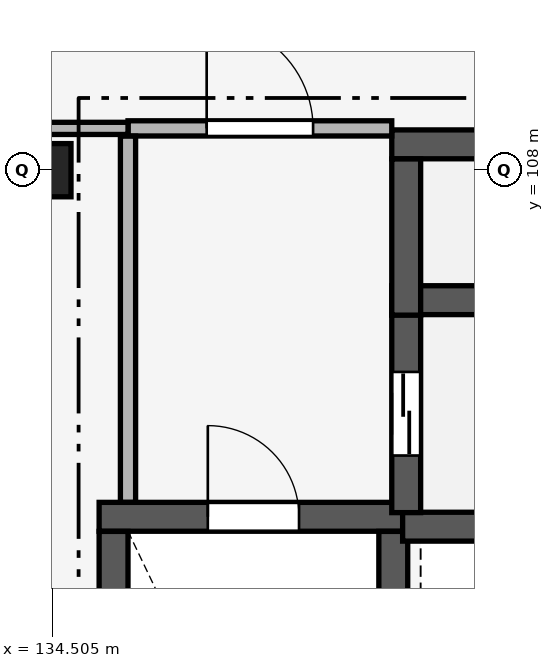
"""IFC4 building model, lengths in metres.
Left out: names, types, materials, properties, quantities, classifications, styles, units other than length and angle.
Written with IfcOpenShell. Run it as: python <this file> out.ifc"""

import sys

from ifc_helpers import new_model, si_unit, direction, frame, frame_2d, origin, origin_2d, place, context, subcontext, project, spatial, rectangle, extrude, element, fill, save


model = new_model("IFC4")
c1 = context("Model", 3, precision=1e-05, world=origin(), true_north=direction((0.0, 1.0)))
c2 = subcontext(c1, "Body", "Model", "MODEL_VIEW")
j1 = project(units=[si_unit("LENGTHUNIT", "METRE"), si_unit("PLANEANGLEUNIT", "RADIAN")], contexts=[c1])
p1 = place(None, origin())
s1 = spatial("IfcSite", under=j1, at=p1, CompositionType="ELEMENT")
p2 = place(p1, origin())
s2 = spatial("IfcBuilding", under=s1, at=p2, CompositionType="ELEMENT")
p3 = place(p2, frame((0.0, 0.0, 25.2)))
s3 = spatial("IfcBuildingStorey", under=s2, at=p3, CompositionType="ELEMENT", Elevation=25.2)
p4 = place(p3, frame((134.4, 108.0, 0.0), z_axis=(0.0, 0.0, 1.0), x_axis=(1.0, 0.0, 0.0)))
e1 = element("IfcColumn", 1, at=p4, inside=s3, PredefinedType="COLUMN", context=c2, shape_type="SweptSolid", body=[
    extrude(rectangle(XDim=0.7, YDim=0.7, at=origin_2d()), origin(), (0.0, 0.0, 1.0), 4.2),
])
p5 = place(p3, frame((135.12, 103.44, 0.0), z_axis=(0.0, 0.0, 1.0), x_axis=(1.0, 0.0, 0.0)))
e2 = element("IfcWall", 2, at=p5, inside=s3, PredefinedType="SHEAR", context=c2, shape_type="SweptSolid", body=[
    extrude(rectangle(XDim=4.06, YDim=0.38, at=frame_2d((2.03, 0.0))), origin(), (0.0, 0.0, 1.0), 3.95),
])
p6 = place(p5, frame((1.43, 0.0, 0.0)))
e3 = element("IfcOpeningElement", 3, at=p6, cuts=e2, PredefinedType="OPENING", context=c2, shape_type="SweptSolid", body=[
    extrude(rectangle(XDim=1.2, YDim=2.2, at=frame_2d((0.6, 1.1))), frame((0.0, 0.205, 0.0), z_axis=(0.0, -1.0, 0.0), x_axis=(1.0, 0.0, 0.0)), (0.0, 0.0, 1.0), 0.41),
])
for number, where, z_axis, x_axis in (
    (4, (135.31, 96.352, 0.0), (0.0, 0.0, 1.0), (0.0, 1.0, 0.0)),
    (5, (138.99, 96.352, 0.0), (0.0, 0.0, 1.0), (0.0, 1.0, 0.0)),
):
    element("IfcWall", number, at=place(p3, frame(where, z_axis=z_axis, x_axis=x_axis)), inside=s3, PredefinedType="SHEAR", context=c2, shape_type="SweptSolid", body=[
        extrude(rectangle(XDim=6.896, YDim=0.38, at=frame_2d((3.448, 0.0))), origin(), (0.0, 0.0, 1.0), 3.95),
    ])
p7 = place(p3, frame((139.113, 103.31, 0.0), z_axis=(0.0, 0.0, 1.0), x_axis=(1.0, 0.0, 0.0)))
e6 = element("IfcWall", 6, at=p7, inside=s3, PredefinedType="SHEAR", context=c2, shape_type="SweptSolid", body=[
    extrude(rectangle(XDim=3.017, YDim=0.38, at=frame_2d((1.508, 0.0))), origin(), (0.0, 0.0, 1.0), 3.95),
])
p8 = place(p3, frame((138.97, 106.29, 0.0), z_axis=(0.0, 0.0, 1.0), x_axis=(1.0, 0.0, 0.0)))
e7 = element("IfcWall", 7, at=p8, inside=s3, PredefinedType="SHEAR", context=c2, shape_type="SweptSolid", body=[
    extrude(rectangle(XDim=3.16, YDim=0.38, at=frame_2d((1.58, 0.0))), origin(), (0.0, 0.0, 1.0), 3.95),
])
p9 = place(p3, frame((139.16, 103.495, 0.0), z_axis=(0.0, 0.0, 1.0), x_axis=(0.0, 1.0, 0.0)))
e8 = element("IfcWall", 8, at=p9, inside=s3, PredefinedType="SHEAR", context=c2, shape_type="SweptSolid", body=[
    extrude(rectangle(XDim=2.603, YDim=0.38, at=frame_2d((1.301, 0.0))), origin(), (0.0, 0.0, 1.0), 3.95),
])
p10 = place(p9, frame((0.751, 0.0, 0.0)))
e9 = element("IfcOpeningElement", 9, at=p10, cuts=e8, PredefinedType="OPENING", context=c2, shape_type="SweptSolid", body=[
    extrude(rectangle(XDim=1.1, YDim=2.15, at=frame_2d((0.55, 1.075))), frame((0.0, 0.205, 0.0), z_axis=(0.0, -1.0, 0.0), x_axis=(1.0, 0.0, 0.0)), (0.0, 0.0, 1.0), 0.41),
])
p11 = place(p3, frame((138.97, 108.34, 0.0), z_axis=(0.0, 0.0, 1.0), x_axis=(1.0, 0.0, 0.0)))
e10 = element("IfcWall", 10, at=p11, inside=s3, PredefinedType="SHEAR", context=c2, shape_type="SweptSolid", body=[
    extrude(rectangle(XDim=3.485, YDim=0.38, at=frame_2d((1.743, 0.0))), origin(), (0.0, 0.0, 1.0), 3.95),
])
p12 = place(p11, frame((1.193, 0.0, 0.0)))
e11 = element("IfcOpeningElement", 11, at=p12, cuts=e10, PredefinedType="OPENING", context=c2, shape_type="SweptSolid", body=[
    extrude(rectangle(XDim=1.1, YDim=2.15, at=frame_2d((0.55, 1.075))), frame((0.0, 0.205, 0.0), z_axis=(0.0, -1.0, 0.0), x_axis=(1.0, 0.0, 0.0)), (0.0, 0.0, 1.0), 0.41),
])
p13 = place(p3, frame((139.16, 106.093, 0.0), z_axis=(0.0, 0.0, 1.0), x_axis=(0.0, 1.0, 0.0)))
e12 = element("IfcWall", 12, at=p13, inside=s3, PredefinedType="SHEAR", context=c2, shape_type="SweptSolid", body=[
    extrude(rectangle(XDim=2.055, YDim=0.38, at=frame_2d((1.027, 0.0))), origin(), (0.0, 0.0, 1.0), 3.95),
])
p14 = place(p3, frame((135.5, 108.55, 0.0), z_axis=(0.0, 0.0, 1.0), x_axis=(1.0, 0.0, 0.0)))
e13 = element("IfcWall", 13, at=p14, inside=s3, PredefinedType="PARTITIONING", context=c2, shape_type="SweptSolid", body=[
    extrude(rectangle(XDim=3.47, YDim=0.2, at=frame_2d((1.735, 0.0))), origin(), (0.0, 0.0, 1.0), 3.95),
])
p15 = place(p14, frame((1.035, 0.0, 0.0)))
e14 = element("IfcOpeningElement", 14, at=p15, cuts=e13, PredefinedType="OPENING", context=c2, shape_type="SweptSolid", body=[
    extrude(rectangle(XDim=1.4, YDim=2.2, at=frame_2d((0.7, 1.1))), frame((0.0, 0.115, 0.0), z_axis=(0.0, -1.0, 0.0), x_axis=(1.0, 0.0, 0.0)), (0.0, 0.0, 1.0), 0.23),
])
p16 = place(p3, frame((134.25, 108.55, 0.0), z_axis=(0.0, 0.0, 1.0), x_axis=(1.0, 0.0, 0.0)))
e15 = element("IfcWall", 15, at=p16, inside=s3, PredefinedType="PARTITIONING", context=c2, shape_type="SweptSolid", body=[
    extrude(rectangle(XDim=1.25, YDim=0.16, at=frame_2d((0.625, 0.0))), origin(), (0.0, 0.0, 1.0), 3.4),
])
p17 = place(p3, frame((135.5, 103.632, 0.0), z_axis=(0.0, 0.0, 1.0), x_axis=(0.0, 1.0, 0.0)))
e16 = element("IfcWall", 16, at=p17, inside=s3, PredefinedType="PARTITIONING", context=c2, shape_type="SweptSolid", body=[
    extrude(rectangle(XDim=4.816, YDim=0.2, at=frame_2d((2.408, 0.0))), origin(), (0.0, 0.0, 1.0), 3.95),
])
p18 = place(p6, origin())
e17 = element("IfcDoor", 17, at=p18, inside=s3, OperationType="SINGLE_SWING_LEFT", PredefinedType="DOOR", context=c2, shape_type="SweptSolid", body=[
    extrude(rectangle(XDim=1.2, YDim=2.2, at=frame_2d((0.6, 1.1))), frame((0.0, 0.025, 0.0), z_axis=(0.0, -1.0, 0.0), x_axis=(1.0, 0.0, 0.0)), (0.0, 0.0, 1.0), 0.05),
])
fill(e3, e17)
p19 = place(p10, origin())
e18 = element("IfcDoor", 18, at=p19, inside=s3, OperationType="DOUBLE_DOOR_SLIDING", PredefinedType="DOOR", context=c2, shape_type="SweptSolid", body=[
    extrude(rectangle(XDim=1.1, YDim=2.15, at=frame_2d((0.55, 1.075))), frame((0.0, 0.025, 0.0), z_axis=(0.0, -1.0, 0.0), x_axis=(1.0, 0.0, 0.0)), (0.0, 0.0, 1.0), 0.05),
])
fill(e9, e18)
p20 = place(p15, origin())
e19 = element("IfcDoor", 19, at=p20, inside=s3, OperationType="SINGLE_SWING_LEFT", PredefinedType="DOOR", context=c2, shape_type="SweptSolid", body=[
    extrude(rectangle(XDim=1.4, YDim=2.2, at=frame_2d((0.7, 1.1))), frame((0.0, 0.025, 0.0), z_axis=(0.0, -1.0, 0.0), x_axis=(1.0, 0.0, 0.0)), (0.0, 0.0, 1.0), 0.05),
])
fill(e14, e19)
save(model, sys.argv[1])
